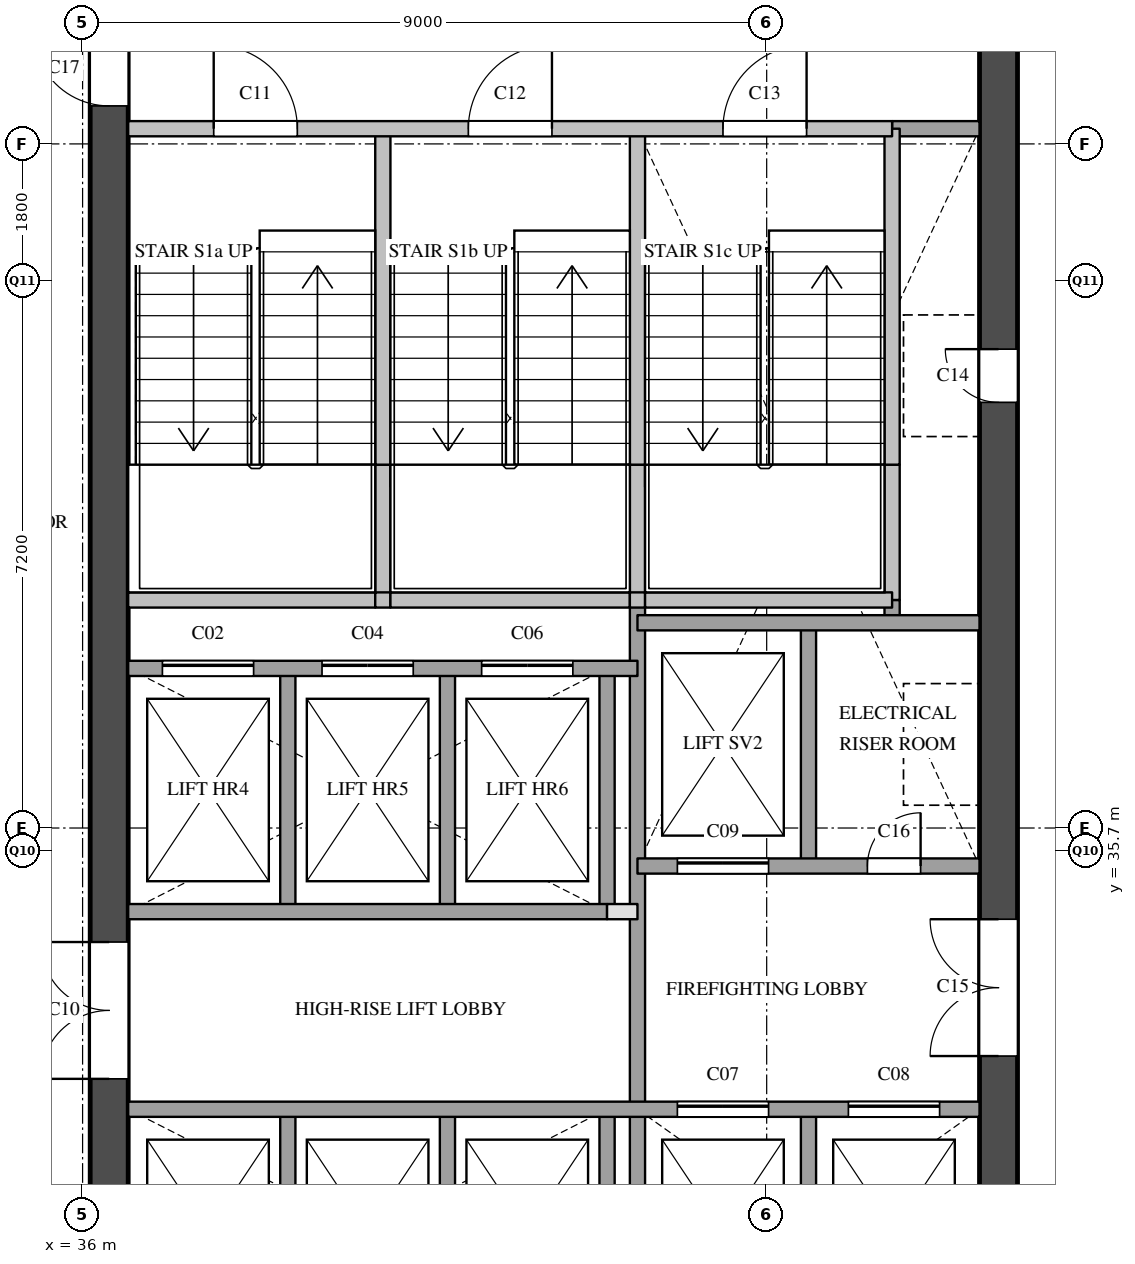
"""IFC4 building model, lengths in metres.
Left out: names, types, materials, properties, quantities, classifications, styles, units other than length and angle.
Written with IfcOpenShell. Run it as: python <this file> out.ifc"""

import sys

from ifc_helpers import new_model, si_unit, direction, frame, frame_2d, origin, place, context, subcontext, project, spatial, rectangle, extrude, element, fill, save


model = new_model("IFC4")
c1 = context("Model", 3, precision=1e-05, world=origin(), true_north=direction((0.0, 1.0)))
c2 = subcontext(c1, "Body", "Model", "MODEL_VIEW")
j1 = project(units=[si_unit("LENGTHUNIT", "METRE"), si_unit("PLANEANGLEUNIT", "RADIAN")], contexts=[c1])
p1 = place(None, origin())
s1 = spatial("IfcSite", under=j1, at=p1, CompositionType="ELEMENT")
p2 = place(p1, origin())
s2 = spatial("IfcBuilding", under=s1, at=p2, CompositionType="ELEMENT")
p3 = place(p2, frame((0.0, 0.0, 173.9)))
s3 = spatial("IfcBuildingStorey", under=s2, at=p3, CompositionType="ELEMENT", Elevation=173.9)
p4 = place(p3, frame((36.35, 29.1, 0.0), z_axis=(0.0, 0.0, 1.0), x_axis=(0.0, 1.0, 0.0)))
e1 = element("IfcWall", 1, at=p4, inside=s3, PredefinedType="SHEAR", context=c2, shape_type="SweptSolid", body=[
    extrude(rectangle(XDim=20.3, YDim=0.5, at=frame_2d((10.15, 0.0))), origin(), (0.0, 0.0, 1.0), 3.6),
])
p5 = place(p4, frame((3.6, 0.0, 0.0)))
e2 = element("IfcOpeningElement", 2, at=p5, cuts=e1, PredefinedType="OPENING", context=c2, shape_type="SweptSolid", body=[
    extrude(rectangle(XDim=1.8, YDim=2.1, at=frame_2d((0.9, 1.05))), frame((0.0, 0.26, 0.0), z_axis=(0.0, -1.0, 0.0), x_axis=(1.0, 0.0, 0.0)), (0.0, 0.0, 1.0), 0.52),
])
p6 = place(p4, frame((16.4, 0.0, 0.0)))
e3 = element("IfcOpeningElement", 3, at=p6, cuts=e1, PredefinedType="OPENING", context=c2, shape_type="SweptSolid", body=[
    extrude(rectangle(XDim=1.0, YDim=2.1, at=frame_2d((0.5, 1.05))), frame((0.0, 0.26, 0.0), z_axis=(0.0, -1.0, 0.0), x_axis=(1.0, 0.0, 0.0)), (0.0, 0.0, 1.0), 0.52),
])
p7 = place(p3, frame((48.05, 29.1, 0.0), z_axis=(0.0, 0.0, 1.0), x_axis=(0.0, 1.0, 0.0)))
e4 = element("IfcWall", 4, at=p7, inside=s3, PredefinedType="SHEAR", context=c2, shape_type="SweptSolid", body=[
    extrude(rectangle(XDim=20.3, YDim=0.5, at=frame_2d((10.15, 0.0))), origin(), (0.0, 0.0, 1.0), 3.6),
])
p8 = place(p7, frame((12.5, 0.0, 0.0)))
e5 = element("IfcOpeningElement", 5, at=p8, cuts=e4, PredefinedType="OPENING", context=c2, shape_type="SweptSolid", body=[
    extrude(rectangle(XDim=0.7, YDim=2.1, at=frame_2d((0.35, 1.05))), frame((0.0, 0.26, 0.0), z_axis=(0.0, -1.0, 0.0), x_axis=(1.0, 0.0, 0.0)), (0.0, 0.0, 1.0), 0.52),
])
p9 = place(p7, frame((3.9, 0.0, 0.0)))
e6 = element("IfcOpeningElement", 6, at=p9, cuts=e4, PredefinedType="OPENING", context=c2, shape_type="SweptSolid", body=[
    extrude(rectangle(XDim=1.8, YDim=2.1, at=frame_2d((0.9, 1.05))), frame((0.0, 0.26, 0.0), z_axis=(0.0, -1.0, 0.0), x_axis=(1.0, 0.0, 0.0)), (0.0, 0.0, 1.0), 0.52),
])
p10 = place(p3, frame((38.7, 29.1, 0.0), z_axis=(0.0, 0.0, 1.0), x_axis=(0.0, 1.0, 0.0)))
e7 = element("IfcWall", 7, at=p10, inside=s3, PredefinedType="SOLIDWALL", context=c2, shape_type="SweptSolid", body=[
    extrude(rectangle(XDim=3.2, YDim=0.2, at=frame_2d((1.6, 0.0))), origin(), (0.0, 0.0, 1.0), 3.6),
])
p11 = place(p3, frame((38.7, 34.9, 0.0), z_axis=(0.0, 0.0, 1.0), x_axis=(0.0, 1.0, 0.0)))
e8 = element("IfcWall", 8, at=p11, inside=s3, PredefinedType="SOLIDWALL", context=c2, shape_type="SweptSolid", body=[
    extrude(rectangle(XDim=3.2, YDim=0.2, at=frame_2d((1.6, 0.0))), origin(), (0.0, 0.0, 1.0), 3.6),
])
p12 = place(p3, frame((39.95, 39.0, 0.0), z_axis=(0.0, 0.0, 1.0), x_axis=(0.0, 1.0, 0.0)))
e9 = element("IfcWall", 9, at=p12, inside=s3, PredefinedType="SOLIDWALL", context=c2, shape_type="SweptSolid", body=[
    extrude(rectangle(XDim=1.78, YDim=0.2, at=frame_2d((0.89, 0.0))), origin(), (0.0, 0.0, 1.0), 3.6),
])
p13 = place(p3, frame((39.95, 40.78, 0.0), z_axis=(0.0, 0.0, 1.0), x_axis=(0.0, 1.0, 0.0)))
e10 = element("IfcWall", 10, at=p13, inside=s3, PredefinedType="SOLIDWALL", context=c2, shape_type="SweptSolid", body=[
    extrude(rectangle(XDim=4.42, YDim=0.2, at=frame_2d((2.21, 0.0))), origin(), (0.0, 0.0, 1.0), 3.6),
])
p14 = place(p3, frame((40.8, 29.1, 0.0), z_axis=(0.0, 0.0, 1.0), x_axis=(0.0, 1.0, 0.0)))
e11 = element("IfcWall", 11, at=p14, inside=s3, PredefinedType="SOLIDWALL", context=c2, shape_type="SweptSolid", body=[
    extrude(rectangle(XDim=3.2, YDim=0.2, at=frame_2d((1.6, 0.0))), origin(), (0.0, 0.0, 1.0), 3.6),
])
p15 = place(p3, frame((40.8, 34.9, 0.0), z_axis=(0.0, 0.0, 1.0), x_axis=(0.0, 1.0, 0.0)))
e12 = element("IfcWall", 12, at=p15, inside=s3, PredefinedType="SOLIDWALL", context=c2, shape_type="SweptSolid", body=[
    extrude(rectangle(XDim=3.2, YDim=0.2, at=frame_2d((1.6, 0.0))), origin(), (0.0, 0.0, 1.0), 3.6),
])
p16 = place(p3, frame((42.9, 29.1, 0.0), z_axis=(0.0, 0.0, 1.0), x_axis=(0.0, 1.0, 0.0)))
e13 = element("IfcWall", 13, at=p16, inside=s3, PredefinedType="SOLIDWALL", context=c2, shape_type="SweptSolid", body=[
    extrude(rectangle(XDim=3.2, YDim=0.2, at=frame_2d((1.6, 0.0))), origin(), (0.0, 0.0, 1.0), 3.6),
])
p17 = place(p3, frame((42.9, 34.9, 0.0), z_axis=(0.0, 0.0, 1.0), x_axis=(0.0, 1.0, 0.0)))
e14 = element("IfcWall", 14, at=p17, inside=s3, PredefinedType="SOLIDWALL", context=c2, shape_type="SweptSolid", body=[
    extrude(rectangle(XDim=3.2, YDim=0.2, at=frame_2d((1.6, 0.0))), origin(), (0.0, 0.0, 1.0), 3.6),
])
p18 = place(p3, frame((43.3, 29.1, 0.0), z_axis=(0.0, 0.0, 1.0), x_axis=(0.0, 1.0, 0.0)))
e15 = element("IfcWall", 15, at=p18, inside=s3, PredefinedType="SOLIDWALL", context=c2, shape_type="SweptSolid", body=[
    extrude(rectangle(XDim=9.9, YDim=0.2, at=frame_2d((4.95, 0.0))), origin(), (0.0, 0.0, 1.0), 3.6),
])
p19 = place(p3, frame((43.3, 39.0, 0.0), z_axis=(0.0, 0.0, 1.0), x_axis=(0.0, 1.0, 0.0)))
e16 = element("IfcWall", 16, at=p19, inside=s3, PredefinedType="SOLIDWALL", context=c2, shape_type="SweptSolid", body=[
    extrude(rectangle(XDim=1.78, YDim=0.2, at=frame_2d((0.89, 0.0))), origin(), (0.0, 0.0, 1.0), 3.6),
])
p20 = place(p3, frame((43.3, 40.78, 0.0), z_axis=(0.0, 0.0, 1.0), x_axis=(0.0, 1.0, 0.0)))
e17 = element("IfcWall", 17, at=p20, inside=s3, PredefinedType="SOLIDWALL", context=c2, shape_type="SweptSolid", body=[
    extrude(rectangle(XDim=4.42, YDim=0.2, at=frame_2d((2.21, 0.0))), origin(), (0.0, 0.0, 1.0), 3.6),
])
for number, where, z_axis, x_axis in (
    (18, (45.55, 29.1, 0.0), (0.0, 0.0, 1.0), (0.0, 1.0, 0.0)),
    (19, (45.55, 35.5, 0.0), (0.0, 0.0, 1.0), (0.0, 1.0, 0.0)),
):
    element("IfcWall", number, at=place(p3, frame(where, z_axis=z_axis, x_axis=x_axis)), inside=s3, PredefinedType="SOLIDWALL", context=c2, shape_type="SweptSolid", body=[
        extrude(rectangle(XDim=3.2, YDim=0.2, at=frame_2d((1.6, 0.0))), origin(), (0.0, 0.0, 1.0), 3.6),
    ])
p21 = place(p3, frame((46.65, 38.7, 0.0), z_axis=(0.0, 0.0, 1.0), x_axis=(0.0, 1.0, 0.0)))
e20 = element("IfcWall", 20, at=p21, inside=s3, PredefinedType="SOLIDWALL", context=c2, shape_type="SweptSolid", body=[
    extrude(rectangle(XDim=0.3, YDim=0.2, at=frame_2d((0.15, 0.0))), origin(), (0.0, 0.0, 1.0), 3.6),
])
p22 = place(p3, frame((46.65, 39.0, 0.0), z_axis=(0.0, 0.0, 1.0), x_axis=(0.0, 1.0, 0.0)))
e21 = element("IfcWall", 21, at=p22, inside=s3, PredefinedType="SOLIDWALL", context=c2, shape_type="SweptSolid", body=[
    extrude(rectangle(XDim=1.78, YDim=0.2, at=frame_2d((0.89, 0.0))), origin(), (0.0, 0.0, 1.0), 3.6),
])
p23 = place(p3, frame((46.65, 40.78, 0.0), z_axis=(0.0, 0.0, 1.0), x_axis=(0.0, 1.0, 0.0)))
e22 = element("IfcWall", 22, at=p23, inside=s3, PredefinedType="SOLIDWALL", context=c2, shape_type="SweptSolid", body=[
    extrude(rectangle(XDim=4.42, YDim=0.2, at=frame_2d((2.21, 0.0))), origin(), (0.0, 0.0, 1.0), 3.6),
])
p24 = place(p3, frame((36.6, 32.3, 0.0), z_axis=(0.0, 0.0, 1.0), x_axis=(1.0, 0.0, 0.0)))
e23 = element("IfcWall", 23, at=p24, inside=s3, PredefinedType="SOLIDWALL", context=c2, shape_type="SweptSolid", body=[
    extrude(rectangle(XDim=11.2, YDim=0.2, at=frame_2d((5.6, 0.0))), origin(), (0.0, 0.0, 1.0), 3.6),
])
p25 = place(p24, frame((7.225, 0.0, 0.0)))
e24 = element("IfcOpeningElement", 24, at=p25, cuts=e23, PredefinedType="OPENING", context=c2, shape_type="SweptSolid", body=[
    extrude(rectangle(XDim=1.2, YDim=2.1, at=frame_2d((0.6, 1.05))), frame((0.0, 0.11, 0.0), z_axis=(0.0, -1.0, 0.0), x_axis=(1.0, 0.0, 0.0)), (0.0, 0.0, 1.0), 0.22),
])
p26 = place(p24, frame((9.475, 0.0, 0.0)))
e25 = element("IfcOpeningElement", 25, at=p26, cuts=e23, PredefinedType="OPENING", context=c2, shape_type="SweptSolid", body=[
    extrude(rectangle(XDim=1.2, YDim=2.1, at=frame_2d((0.6, 1.05))), frame((0.0, 0.11, 0.0), z_axis=(0.0, -1.0, 0.0), x_axis=(1.0, 0.0, 0.0)), (0.0, 0.0, 1.0), 0.22),
])
p27 = place(p3, frame((42.9, 34.9, 0.0), z_axis=(0.0, 0.0, 1.0), x_axis=(1.0, 0.0, 0.0)))
e26 = element("IfcWall", 26, at=p27, inside=s3, PredefinedType="PARTITIONING", context=c2, shape_type="SweptSolid", body=[
    extrude(rectangle(XDim=0.4, YDim=0.2, at=frame_2d((0.2, 0.0))), origin(), (0.0, 0.0, 1.0), 3.6),
])
p28 = place(p3, frame((36.6, 34.9, 0.0), z_axis=(0.0, 0.0, 1.0), x_axis=(1.0, 0.0, 0.0)))
e27 = element("IfcWall", 27, at=p28, inside=s3, PredefinedType="SOLIDWALL", context=c2, shape_type="SweptSolid", body=[
    extrude(rectangle(XDim=6.3, YDim=0.2, at=frame_2d((3.15, 0.0))), origin(), (0.0, 0.0, 1.0), 3.6),
])
p29 = place(p3, frame((43.3, 35.5, 0.0), z_axis=(0.0, 0.0, 1.0), x_axis=(1.0, 0.0, 0.0)))
e28 = element("IfcWall", 28, at=p29, inside=s3, PredefinedType="SOLIDWALL", context=c2, shape_type="SweptSolid", body=[
    extrude(rectangle(XDim=4.5, YDim=0.2, at=frame_2d((2.25, 0.0))), origin(), (0.0, 0.0, 1.0), 3.6),
])
p30 = place(p29, frame((0.525, 0.0, 0.0)))
e29 = element("IfcOpeningElement", 29, at=p30, cuts=e28, PredefinedType="OPENING", context=c2, shape_type="SweptSolid", body=[
    extrude(rectangle(XDim=1.2, YDim=2.1, at=frame_2d((0.6, 1.05))), frame((0.0, 0.11, 0.0), z_axis=(0.0, -1.0, 0.0), x_axis=(1.0, 0.0, 0.0)), (0.0, 0.0, 1.0), 0.22),
])
p31 = place(p29, frame((3.025, 0.0, 0.0)))
e30 = element("IfcOpeningElement", 30, at=p31, cuts=e28, PredefinedType="OPENING", context=c2, shape_type="SweptSolid", body=[
    extrude(rectangle(XDim=0.7, YDim=2.1, at=frame_2d((0.35, 1.05))), frame((0.0, 0.11, 0.0), z_axis=(0.0, -1.0, 0.0), x_axis=(1.0, 0.0, 0.0)), (0.0, 0.0, 1.0), 0.22),
])
p32 = place(p3, frame((36.6, 38.1, 0.0), z_axis=(0.0, 0.0, 1.0), x_axis=(1.0, 0.0, 0.0)))
e31 = element("IfcWall", 31, at=p32, inside=s3, PredefinedType="SOLIDWALL", context=c2, shape_type="SweptSolid", body=[
    extrude(rectangle(XDim=6.7, YDim=0.2, at=frame_2d((3.35, 0.0))), origin(), (0.0, 0.0, 1.0), 3.6),
])
p33 = place(p32, frame((0.45, 0.0, 0.0)))
e32 = element("IfcOpeningElement", 32, at=p33, cuts=e31, PredefinedType="OPENING", context=c2, shape_type="SweptSolid", body=[
    extrude(rectangle(XDim=1.2, YDim=2.1, at=frame_2d((0.6, 1.05))), frame((0.0, 0.11, 0.0), z_axis=(0.0, -1.0, 0.0), x_axis=(1.0, 0.0, 0.0)), (0.0, 0.0, 1.0), 0.22),
])
p34 = place(p32, frame((2.55, 0.0, 0.0)))
e33 = element("IfcOpeningElement", 33, at=p34, cuts=e31, PredefinedType="OPENING", context=c2, shape_type="SweptSolid", body=[
    extrude(rectangle(XDim=1.2, YDim=2.1, at=frame_2d((0.6, 1.05))), frame((0.0, 0.11, 0.0), z_axis=(0.0, -1.0, 0.0), x_axis=(1.0, 0.0, 0.0)), (0.0, 0.0, 1.0), 0.22),
])
p35 = place(p32, frame((4.65, 0.0, 0.0)))
e34 = element("IfcOpeningElement", 34, at=p35, cuts=e31, PredefinedType="OPENING", context=c2, shape_type="SweptSolid", body=[
    extrude(rectangle(XDim=1.2, YDim=2.1, at=frame_2d((0.6, 1.05))), frame((0.0, 0.11, 0.0), z_axis=(0.0, -1.0, 0.0), x_axis=(1.0, 0.0, 0.0)), (0.0, 0.0, 1.0), 0.22),
])
p36 = place(p3, frame((43.3, 38.7, 0.0), z_axis=(0.0, 0.0, 1.0), x_axis=(1.0, 0.0, 0.0)))
e35 = element("IfcWall", 35, at=p36, inside=s3, PredefinedType="SOLIDWALL", context=c2, shape_type="SweptSolid", body=[
    extrude(rectangle(XDim=4.5, YDim=0.2, at=frame_2d((2.25, 0.0))), origin(), (0.0, 0.0, 1.0), 3.6),
])
p37 = place(p3, frame((36.6, 39.0, 0.0), z_axis=(0.0, 0.0, 1.0), x_axis=(1.0, 0.0, 0.0)))
e36 = element("IfcWall", 36, at=p37, inside=s3, PredefinedType="SOLIDWALL", context=c2, shape_type="SweptSolid", body=[
    extrude(rectangle(XDim=3.25, YDim=0.2, at=frame_2d((1.625, 0.0))), origin(), (0.0, 0.0, 1.0), 3.6),
])
p38 = place(p3, frame((39.85, 39.0, 0.0), z_axis=(0.0, 0.0, 1.0), x_axis=(1.0, 0.0, 0.0)))
e37 = element("IfcWall", 37, at=p38, inside=s3, PredefinedType="SOLIDWALL", context=c2, shape_type="SweptSolid", body=[
    extrude(rectangle(XDim=0.2, YDim=0.2, at=frame_2d((0.1, 0.0))), origin(), (0.0, 0.0, 1.0), 3.6),
])
p39 = place(p3, frame((40.05, 39.0, 0.0), z_axis=(0.0, 0.0, 1.0), x_axis=(1.0, 0.0, 0.0)))
e38 = element("IfcWall", 38, at=p39, inside=s3, PredefinedType="SOLIDWALL", context=c2, shape_type="SweptSolid", body=[
    extrude(rectangle(XDim=3.15, YDim=0.2, at=frame_2d((1.575, 0.0))), origin(), (0.0, 0.0, 1.0), 3.6),
])
p40 = place(p3, frame((43.2, 39.0, 0.0), z_axis=(0.0, 0.0, 1.0), x_axis=(1.0, 0.0, 0.0)))
e39 = element("IfcWall", 39, at=p40, inside=s3, PredefinedType="SOLIDWALL", context=c2, shape_type="SweptSolid", body=[
    extrude(rectangle(XDim=0.2, YDim=0.2, at=frame_2d((0.1, 0.0))), origin(), (0.0, 0.0, 1.0), 3.6),
])
p41 = place(p3, frame((43.4, 39.0, 0.0), z_axis=(0.0, 0.0, 1.0), x_axis=(1.0, 0.0, 0.0)))
e40 = element("IfcWall", 40, at=p41, inside=s3, PredefinedType="SOLIDWALL", context=c2, shape_type="SweptSolid", body=[
    extrude(rectangle(XDim=3.25, YDim=0.2, at=frame_2d((1.625, 0.0))), origin(), (0.0, 0.0, 1.0), 3.6),
])
p42 = place(p3, frame((46.65, 45.2, 0.0), z_axis=(0.0, 0.0, 1.0), x_axis=(1.0, 0.0, 0.0)))
e41 = element("IfcWall", 41, at=p42, inside=s3, PredefinedType="SOLIDWALL", context=c2, shape_type="SweptSolid", body=[
    extrude(rectangle(XDim=1.15, YDim=0.2, at=frame_2d((0.575, 0.0))), origin(), (0.0, 0.0, 1.0), 3.6),
])
p43 = place(p3, frame((36.6, 45.2, 0.0), z_axis=(0.0, 0.0, 1.0), x_axis=(1.0, 0.0, 0.0)))
e42 = element("IfcWall", 42, at=p43, inside=s3, PredefinedType="SOLIDWALL", context=c2, shape_type="SweptSolid", body=[
    extrude(rectangle(XDim=10.05, YDim=0.2, at=frame_2d((5.025, 0.0))), origin(), (0.0, 0.0, 1.0), 3.6),
])
p44 = place(p43, frame((1.125, 0.0, 0.0)))
e43 = element("IfcOpeningElement", 43, at=p44, cuts=e42, PredefinedType="OPENING", context=c2, shape_type="SweptSolid", body=[
    extrude(rectangle(XDim=1.1, YDim=2.1, at=frame_2d((0.55, 1.05))), frame((0.0, 0.11, 0.0), z_axis=(0.0, -1.0, 0.0), x_axis=(1.0, 0.0, 0.0)), (0.0, 0.0, 1.0), 0.22),
])
p45 = place(p43, frame((4.475, 0.0, 0.0)))
e44 = element("IfcOpeningElement", 44, at=p45, cuts=e42, PredefinedType="OPENING", context=c2, shape_type="SweptSolid", body=[
    extrude(rectangle(XDim=1.1, YDim=2.1, at=frame_2d((0.55, 1.05))), frame((0.0, 0.11, 0.0), z_axis=(0.0, -1.0, 0.0), x_axis=(1.0, 0.0, 0.0)), (0.0, 0.0, 1.0), 0.22),
])
p46 = place(p43, frame((7.825, 0.0, 0.0)))
e45 = element("IfcOpeningElement", 45, at=p46, cuts=e42, PredefinedType="OPENING", context=c2, shape_type="SweptSolid", body=[
    extrude(rectangle(XDim=1.1, YDim=2.1, at=frame_2d((0.55, 1.05))), frame((0.0, 0.11, 0.0), z_axis=(0.0, -1.0, 0.0), x_axis=(1.0, 0.0, 0.0)), (0.0, 0.0, 1.0), 0.22),
])
p47 = place(p33, origin())
e46 = element("IfcDoor", 46, at=p47, inside=s3, OperationType="SLIDING_TO_LEFT", PredefinedType="DOOR", context=c2, shape_type="SweptSolid", body=[
    extrude(rectangle(XDim=1.2, YDim=2.1, at=frame_2d((0.6, 1.05))), frame((0.0, 0.025, 0.0), z_axis=(0.0, -1.0, 0.0), x_axis=(1.0, 0.0, 0.0)), (0.0, 0.0, 1.0), 0.05),
])
fill(e32, e46)
p48 = place(p34, origin())
e47 = element("IfcDoor", 47, at=p48, inside=s3, OperationType="SLIDING_TO_LEFT", PredefinedType="DOOR", context=c2, shape_type="SweptSolid", body=[
    extrude(rectangle(XDim=1.2, YDim=2.1, at=frame_2d((0.6, 1.05))), frame((0.0, 0.025, 0.0), z_axis=(0.0, -1.0, 0.0), x_axis=(1.0, 0.0, 0.0)), (0.0, 0.0, 1.0), 0.05),
])
fill(e33, e47)
p49 = place(p35, origin())
e48 = element("IfcDoor", 48, at=p49, inside=s3, OperationType="SLIDING_TO_LEFT", PredefinedType="DOOR", context=c2, shape_type="SweptSolid", body=[
    extrude(rectangle(XDim=1.2, YDim=2.1, at=frame_2d((0.6, 1.05))), frame((0.0, 0.025, 0.0), z_axis=(0.0, -1.0, 0.0), x_axis=(1.0, 0.0, 0.0)), (0.0, 0.0, 1.0), 0.05),
])
fill(e34, e48)
p50 = place(p25, origin())
e49 = element("IfcDoor", 49, at=p50, inside=s3, OperationType="SLIDING_TO_LEFT", PredefinedType="DOOR", context=c2, shape_type="SweptSolid", body=[
    extrude(rectangle(XDim=1.2, YDim=2.1, at=frame_2d((0.6, 1.05))), frame((0.0, 0.025, 0.0), z_axis=(0.0, -1.0, 0.0), x_axis=(1.0, 0.0, 0.0)), (0.0, 0.0, 1.0), 0.05),
])
fill(e24, e49)
p51 = place(p26, origin())
e50 = element("IfcDoor", 50, at=p51, inside=s3, OperationType="SLIDING_TO_LEFT", PredefinedType="DOOR", context=c2, shape_type="SweptSolid", body=[
    extrude(rectangle(XDim=1.2, YDim=2.1, at=frame_2d((0.6, 1.05))), frame((0.0, 0.025, 0.0), z_axis=(0.0, -1.0, 0.0), x_axis=(1.0, 0.0, 0.0)), (0.0, 0.0, 1.0), 0.05),
])
fill(e25, e50)
p52 = place(p30, origin())
e51 = element("IfcDoor", 51, at=p52, inside=s3, OperationType="SLIDING_TO_LEFT", PredefinedType="DOOR", context=c2, shape_type="SweptSolid", body=[
    extrude(rectangle(XDim=1.2, YDim=2.1, at=frame_2d((0.6, 1.05))), frame((0.0, 0.025, 0.0), z_axis=(0.0, -1.0, 0.0), x_axis=(1.0, 0.0, 0.0)), (0.0, 0.0, 1.0), 0.05),
])
fill(e29, e51)
p53 = place(p5, origin())
e52 = element("IfcDoor", 52, at=p53, inside=s3, OperationType="DOUBLE_DOOR_SINGLE_SWING", PredefinedType="DOOR", context=c2, shape_type="SweptSolid", body=[
    extrude(rectangle(XDim=1.8, YDim=2.1, at=frame_2d((0.9, 1.05))), frame((0.0, 0.025, 0.0), z_axis=(0.0, -1.0, 0.0), x_axis=(1.0, 0.0, 0.0)), (0.0, 0.0, 1.0), 0.05),
])
fill(e2, e52)
p54 = place(p44, origin())
e53 = element("IfcDoor", 53, at=p54, inside=s3, OperationType="SINGLE_SWING_LEFT", PredefinedType="DOOR", context=c2, shape_type="SweptSolid", body=[
    extrude(rectangle(XDim=1.1, YDim=2.1, at=frame_2d((0.55, 1.05))), frame((0.0, 0.025, 0.0), z_axis=(0.0, -1.0, 0.0), x_axis=(1.0, 0.0, 0.0)), (0.0, 0.0, 1.0), 0.05),
])
fill(e43, e53)
p55 = place(p45, origin())
e54 = element("IfcDoor", 54, at=p55, inside=s3, OperationType="SINGLE_SWING_RIGHT", PredefinedType="DOOR", context=c2, shape_type="SweptSolid", body=[
    extrude(rectangle(XDim=1.1, YDim=2.1, at=frame_2d((0.55, 1.05))), frame((0.0, 0.025, 0.0), z_axis=(0.0, -1.0, 0.0), x_axis=(1.0, 0.0, 0.0)), (0.0, 0.0, 1.0), 0.05),
])
fill(e44, e54)
p56 = place(p46, origin())
e55 = element("IfcDoor", 55, at=p56, inside=s3, OperationType="SINGLE_SWING_RIGHT", PredefinedType="DOOR", context=c2, shape_type="SweptSolid", body=[
    extrude(rectangle(XDim=1.1, YDim=2.1, at=frame_2d((0.55, 1.05))), frame((0.0, 0.025, 0.0), z_axis=(0.0, -1.0, 0.0), x_axis=(1.0, 0.0, 0.0)), (0.0, 0.0, 1.0), 0.05),
])
fill(e45, e55)
p57 = place(p8, origin())
e56 = element("IfcDoor", 56, at=p57, inside=s3, OperationType="SINGLE_SWING_RIGHT", PredefinedType="DOOR", context=c2, shape_type="SweptSolid", body=[
    extrude(rectangle(XDim=0.7, YDim=2.1, at=frame_2d((0.35, 1.05))), frame((0.0, 0.025, 0.0), z_axis=(0.0, -1.0, 0.0), x_axis=(1.0, 0.0, 0.0)), (0.0, 0.0, 1.0), 0.05),
])
fill(e5, e56)
p58 = place(p9, origin())
e57 = element("IfcDoor", 57, at=p58, inside=s3, OperationType="DOUBLE_DOOR_SINGLE_SWING", PredefinedType="DOOR", context=c2, shape_type="SweptSolid", body=[
    extrude(rectangle(XDim=1.8, YDim=2.1, at=frame_2d((0.9, 1.05))), frame((0.0, 0.025, 0.0), z_axis=(0.0, -1.0, 0.0), x_axis=(1.0, 0.0, 0.0)), (0.0, 0.0, 1.0), 0.05),
])
fill(e6, e57)
p59 = place(p31, origin())
e58 = element("IfcDoor", 58, at=p59, inside=s3, OperationType="SINGLE_SWING_RIGHT", PredefinedType="DOOR", context=c2, shape_type="SweptSolid", body=[
    extrude(rectangle(XDim=0.7, YDim=2.1, at=frame_2d((0.35, 1.05))), frame((0.0, 0.025, 0.0), z_axis=(0.0, -1.0, 0.0), x_axis=(1.0, 0.0, 0.0)), (0.0, 0.0, 1.0), 0.05),
])
fill(e30, e58)
p60 = place(p6, origin())
e59 = element("IfcDoor", 59, at=p60, inside=s3, OperationType="SINGLE_SWING_RIGHT", PredefinedType="DOOR", context=c2, shape_type="SweptSolid", body=[
    extrude(rectangle(XDim=1.0, YDim=2.1, at=frame_2d((0.5, 1.05))), frame((0.0, 0.025, 0.0), z_axis=(0.0, -1.0, 0.0), x_axis=(1.0, 0.0, 0.0)), (0.0, 0.0, 1.0), 0.05),
])
fill(e3, e59)
save(model, sys.argv[1])
